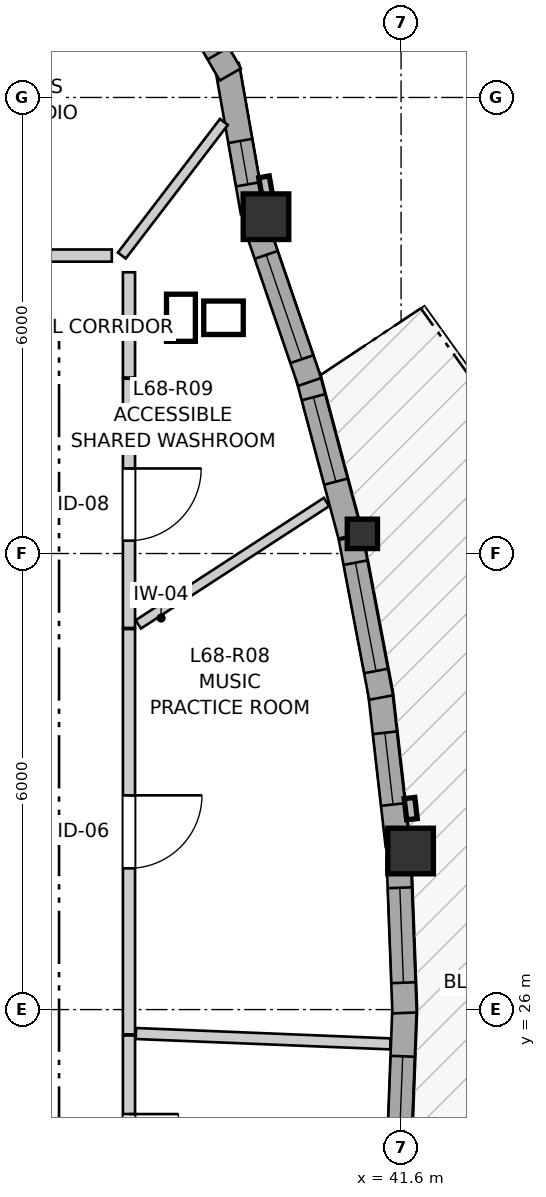
"""IFC4 building model, lengths in metres.
Left out: names, types, materials, properties, quantities, classifications, styles, units other than length and angle.
Written with IfcOpenShell. Run it as: python <this file> out.ifc"""

import sys

from ifc_helpers import new_model, si_unit, direction, frame, frame_2d, origin, origin_2d, place, context, subcontext, project, spatial, rectangle, i_section, extrude, source, transform, mapped, element, fill, save


model = new_model("IFC4")
c1 = context("Model", 3, precision=1e-05, world=origin(), true_north=direction((0.0, 1.0)))
c2 = subcontext(c1, "Body", "Model", "MODEL_VIEW")
j1 = project(units=[si_unit("LENGTHUNIT", "METRE"), si_unit("PLANEANGLEUNIT", "RADIAN")], contexts=[c1])
p1 = place(None, origin())
s1 = spatial("IfcSite", under=j1, at=p1, CompositionType="ELEMENT")
p2 = place(p1, origin())
s2 = spatial("IfcBuilding", under=s1, at=p2, CompositionType="ELEMENT")
p3 = place(p2, frame((0.0, 0.0, 227.6)))
s3 = spatial("IfcBuildingStorey", under=s2, at=p3, CompositionType="ELEMENT", Elevation=227.6)
m1 = source(origin(), c2, "Body", "SweptSolid", [
    extrude(rectangle(XDim=0.6, YDim=0.6, at=origin_2d()), origin(), (0.0, 0.0, 1.0), 2.96),
])
p4 = place(p3, frame((41.725, 28.086, 0.0), z_axis=(0.0, 0.0, 1.0), x_axis=(1.0, 0.0, 0.0)))
e1 = element("IfcColumn", 1, at=p4, inside=s3, PredefinedType="COLUMN", context=c2, shape_type="MappedRepresentation", body=[
    mapped(m1, transform((0.0, 0.0, 0.0), x_axis=(1.0, 0.0, 0.0), y_axis=(0.0, 1.0, 0.0), z_axis=(0.0, 0.0, 1.0), scale=1.0)),
])
m2 = source(origin(), c2, "Body", "SweptSolid", [
    extrude(i_section(OverallWidth=0.398, OverallDepth=0.387, WebThickness=0.019, FlangeThickness=0.03, FilletRadius=0.015, at=origin_2d()), origin(), (0.0, 0.0, 1.0), 2.96),
])
p5 = place(p3, frame((41.091, 32.259, 0.0), z_axis=(0.0, 0.0, 1.0), x_axis=(1.0, 0.0, 0.0)))
e2 = element("IfcColumn", 2, at=p5, inside=s3, PredefinedType="PILASTER", context=c2, shape_type="MappedRepresentation", body=[
    mapped(m2, transform((0.0, 0.0, 0.0), x_axis=(1.0, 0.0, 0.0), y_axis=(0.0, 1.0, 0.0), z_axis=(0.0, 0.0, 1.0), scale=1.0)),
])
p6 = place(p3, frame((39.823, 36.431, 0.0), z_axis=(0.0, 0.0, 1.0), x_axis=(1.0, 0.0, 0.0)))
e3 = element("IfcColumn", 3, at=p6, inside=s3, PredefinedType="COLUMN", context=c2, shape_type="MappedRepresentation", body=[
    mapped(m1, transform((0.0, 0.0, 0.0), x_axis=(1.0, 0.0, 0.0), y_axis=(0.0, 1.0, 0.0), z_axis=(0.0, 0.0, 1.0), scale=1.0)),
])
p7 = place(p3, frame((41.566, 23.94, 0.0), z_axis=(0.0, 0.0, 1.0), x_axis=(0.037912160544, 0.999281075615, 0.0)))
e4 = element("IfcWall", 4, at=p7, inside=s3, PredefinedType="SOLIDWALL", context=c2, shape_type="SweptSolid", body=[
    extrude(rectangle(XDim=2.106, YDim=0.32, at=frame_2d((1.053, 0.0))), origin(), (0.0, 0.0, 1.0), 2.58),
])
p8 = place(p7, frame((0.297, 0.0, 0.82)))
e5 = element("IfcOpeningElement", 5, at=p8, cuts=e4, PredefinedType="OPENING", context=c2, shape_type="SweptSolid", body=[
    extrude(rectangle(XDim=1.15, YDim=1.2, at=frame_2d((0.575, 0.6))), frame((0.0, 0.17, 0.0), z_axis=(0.0, -1.0, 0.0), x_axis=(1.0, 0.0, 0.0)), (0.0, 0.0, 1.0), 0.34),
])
p9 = place(p3, frame((41.646, 25.956, 0.0), z_axis=(0.0, 0.0, 1.0), x_axis=(-0.038018581285, 0.999277032397, 0.0)))
e6 = element("IfcWall", 6, at=p9, inside=s3, PredefinedType="SOLIDWALL", context=c2, shape_type="SweptSolid", body=[
    extrude(rectangle(XDim=2.036, YDim=0.32, at=frame_2d((1.018, 0.0))), origin(), (0.0, 0.0, 1.0), 2.58),
])
p10 = place(p9, frame((0.398, 0.0, 0.82)))
e7 = element("IfcOpeningElement", 7, at=p10, cuts=e6, PredefinedType="OPENING", context=c2, shape_type="SweptSolid", body=[
    extrude(rectangle(XDim=1.25, YDim=1.35, at=frame_2d((0.625, 0.675))), frame((0.0, 0.17, 0.0), z_axis=(0.0, -1.0, 0.0), x_axis=(1.0, 0.0, 0.0)), (0.0, 0.0, 1.0), 0.34),
])
p11 = place(p3, frame((41.556, 28.158, 0.0), z_axis=(0.0, 0.0, 1.0), x_axis=(-0.113270843693, 0.993564147888, 0.0)))
e8 = element("IfcWall", 8, at=p11, inside=s3, PredefinedType="SOLIDWALL", context=c2, shape_type="SweptSolid", body=[
    extrude(rectangle(XDim=2.048, YDim=0.32, at=frame_2d((1.024, 0.0))), origin(), (0.0, 0.0, 1.0), 2.58),
])
p12 = place(p11, frame((0.544, 0.0, 0.82)))
e9 = element("IfcOpeningElement", 9, at=p12, cuts=e8, PredefinedType="OPENING", context=c2, shape_type="SweptSolid", body=[
    extrude(rectangle(XDim=0.95, YDim=1.35, at=frame_2d((0.475, 0.675))), frame((0.0, 0.17, 0.0), z_axis=(0.0, -1.0, 0.0), x_axis=(1.0, 0.0, 0.0)), (0.0, 0.0, 1.0), 0.34),
])
p13 = place(p3, frame((41.337, 30.105, 0.0), z_axis=(0.0, 0.0, 1.0), x_axis=(-0.186614434744, 0.98243323068, 0.0)))
e10 = element("IfcWall", 10, at=p13, inside=s3, PredefinedType="SOLIDWALL", context=c2, shape_type="SweptSolid", body=[
    extrude(rectangle(XDim=2.142, YDim=0.32, at=frame_2d((1.071, 0.0))), origin(), (0.0, 0.0, 1.0), 2.58),
])
p14 = place(p13, frame((0.356, 0.0, 0.82)))
e11 = element("IfcOpeningElement", 11, at=p14, cuts=e10, PredefinedType="OPENING", context=c2, shape_type="SweptSolid", body=[
    extrude(rectangle(XDim=1.45, YDim=1.25, at=frame_2d((0.725, 0.625))), frame((0.0, 0.17, 0.0), z_axis=(0.0, -1.0, 0.0), x_axis=(1.0, 0.0, 0.0)), (0.0, 0.0, 1.0), 0.34),
])
p15 = place(p3, frame((40.931, 32.237, 0.0), z_axis=(0.0, 0.0, 1.0), x_axis=(-0.257076193941, 0.966391137433, 0.0)))
e12 = element("IfcWall", 12, at=p15, inside=s3, PredefinedType="SOLIDWALL", context=c2, shape_type="SweptSolid", body=[
    extrude(rectangle(XDim=2.177, YDim=0.32, at=frame_2d((1.088, 0.0))), origin(), (0.0, 0.0, 1.0), 2.58),
])
p16 = place(p15, frame((0.733, 0.0, 0.82)))
e13 = element("IfcOpeningElement", 13, at=p16, cuts=e12, PredefinedType="OPENING", context=c2, shape_type="SweptSolid", body=[
    extrude(rectangle(XDim=1.15, YDim=1.2, at=frame_2d((0.575, 0.6))), frame((0.0, 0.17, 0.0), z_axis=(0.0, -1.0, 0.0), x_axis=(1.0, 0.0, 0.0)), (0.0, 0.0, 1.0), 0.34),
])
p17 = place(p3, frame((40.397, 34.257, 0.0), z_axis=(0.0, 0.0, 1.0), x_axis=(-0.323634249216, 0.9461822619, 0.0)))
e14 = element("IfcWall", 14, at=p17, inside=s3, PredefinedType="SOLIDWALL", context=c2, shape_type="SweptSolid", body=[
    extrude(rectangle(XDim=2.153, YDim=0.32, at=frame_2d((1.077, 0.0))), origin(), (0.0, 0.0, 1.0), 2.58),
])
p18 = place(p17, frame((0.316, 0.0, 0.82)))
e15 = element("IfcOpeningElement", 15, at=p18, cuts=e14, PredefinedType="OPENING", context=c2, shape_type="SweptSolid", body=[
    extrude(rectangle(XDim=1.45, YDim=1.25, at=frame_2d((0.725, 0.625))), frame((0.0, 0.17, 0.0), z_axis=(0.0, -1.0, 0.0), x_axis=(1.0, 0.0, 0.0)), (0.0, 0.0, 1.0), 0.34),
])
p19 = place(p3, frame((39.649, 36.492, 0.0), z_axis=(0.0, 0.0, 1.0), x_axis=(-0.173693060482, 0.984799837906, 0.0)))
e16 = element("IfcWall", 16, at=p19, inside=s3, PredefinedType="SOLIDWALL", context=c2, shape_type="SweptSolid", body=[
    extrude(rectangle(XDim=1.962, YDim=0.32, at=frame_2d((0.981, 0.0))), origin(), (0.0, 0.0, 1.0), 2.58),
])
p20 = place(p19, frame((0.371, 0.0, 0.82)))
e17 = element("IfcOpeningElement", 17, at=p20, cuts=e16, PredefinedType="OPENING", context=c2, shape_type="SweptSolid", body=[
    extrude(rectangle(XDim=0.58, YDim=1.35, at=frame_2d((0.29, 0.675))), frame((0.0, 0.17, 0.0), z_axis=(0.0, -1.0, 0.0), x_axis=(1.0, 0.0, 0.0)), (0.0, 0.0, 1.0), 0.34),
])
p21 = place(p3, frame((39.353, 38.302, 0.0), z_axis=(0.0, 0.0, 1.0), x_axis=(-0.49990781971, 0.866078617559, 0.0)))
e18 = element("IfcWall", 18, at=p21, inside=s3, PredefinedType="SOLIDWALL", context=c2, shape_type="SweptSolid", body=[
    extrude(rectangle(XDim=2.09, YDim=0.32, at=frame_2d((1.045, 0.0))), origin(), (0.0, 0.0, 1.0), 2.58),
])
p22 = place(p21, frame((0.32, 0.0, 0.82)))
e19 = element("IfcOpeningElement", 19, at=p22, cuts=e18, PredefinedType="OPENING", context=c2, shape_type="SweptSolid", body=[
    extrude(rectangle(XDim=1.45, YDim=1.25, at=frame_2d((0.725, 0.625))), frame((0.0, 0.17, 0.0), z_axis=(0.0, -1.0, 0.0), x_axis=(1.0, 0.0, 0.0)), (0.0, 0.0, 1.0), 0.34),
])
p23 = place(p3, frame((38.02, 31.006, 0.0), z_axis=(0.0, 0.0, 1.0), x_axis=(0.0, -1.0, 0.0)))
e20 = element("IfcWall", 20, at=p23, inside=s3, PredefinedType="PARTITIONING", context=c2, shape_type="SweptSolid", body=[
    extrude(rectangle(XDim=5.332, YDim=0.16, at=frame_2d((2.666, 0.0))), origin(), (0.0, 0.0, 1.0), 2.628),
])
p24 = place(p23, frame((2.188, 0.0, 0.0)))
e21 = element("IfcOpeningElement", 21, at=p24, cuts=e20, PredefinedType="OPENING", context=c2, shape_type="SweptSolid", body=[
    extrude(rectangle(XDim=0.96, YDim=2.1, at=frame_2d((0.48, 1.05))), frame((0.0, 0.09, 0.0), z_axis=(0.0, -1.0, 0.0), x_axis=(1.0, 0.0, 0.0)), (0.0, 0.0, 1.0), 0.18),
])
p25 = place(p3, frame((38.02, 25.659, 0.0), z_axis=(0.0, 0.0, 1.0), x_axis=(0.0, -1.0, 0.0)))
e22 = element("IfcWall", 22, at=p25, inside=s3, PredefinedType="PARTITIONING", context=c2, shape_type="SweptSolid", body=[
    extrude(rectangle(XDim=3.414, YDim=0.16, at=frame_2d((1.707, 0.0))), origin(), (0.0, 0.0, 1.0), 2.628),
])
p26 = place(p25, frame((1.033, 0.0, 0.0)))
e23 = element("IfcOpeningElement", 23, at=p26, cuts=e22, PredefinedType="OPENING", context=c2, shape_type="SweptSolid", body=[
    extrude(rectangle(XDim=1.3, YDim=2.1, at=frame_2d((0.65, 1.05))), frame((0.0, 0.09, 0.0), z_axis=(0.0, -1.0, 0.0), x_axis=(1.0, 0.0, 0.0)), (0.0, 0.0, 1.0), 0.18),
])
p27 = place(p3, frame((38.02, 34.3, 0.0), z_axis=(0.0, 0.0, 1.0), x_axis=(0.0, -1.0, 0.0)))
e24 = element("IfcWall", 24, at=p27, inside=s3, PredefinedType="PARTITIONING", context=c2, shape_type="SweptSolid", body=[
    extrude(rectangle(XDim=3.279, YDim=0.16, at=frame_2d((1.64, 0.0))), origin(), (0.0, 0.0, 1.0), 2.628),
])
p28 = place(p27, frame((1.181, 0.0, 0.0)))
e25 = element("IfcOpeningElement", 25, at=p28, cuts=e24, PredefinedType="OPENING", context=c2, shape_type="SweptSolid", body=[
    extrude(rectangle(XDim=0.95, YDim=2.1, at=frame_2d((0.475, 1.05))), frame((0.0, 0.09, 0.0), z_axis=(0.0, -1.0, 0.0), x_axis=(1.0, 0.0, 0.0)), (0.0, 0.0, 1.0), 0.18),
])
p29 = place(p3, frame((38.111, 25.685, 0.0), z_axis=(0.0, 0.0, 1.0), x_axis=(0.999167325882, -0.040800182477, 0.0)))
e26 = element("IfcWall", 26, at=p29, inside=s3, PredefinedType="PARTITIONING", context=c2, shape_type="SweptSolid", body=[
    extrude(rectangle(XDim=3.351, YDim=0.145, at=frame_2d((1.675, 0.0))), origin(), (0.0, 0.0, 1.0), 2.96),
])
p30 = place(p3, frame((38.142, 31.067, 0.0), z_axis=(0.0, 0.0, 1.0), x_axis=(0.838351109823, 0.545130641827, 0.0)))
e27 = element("IfcWall", 27, at=p30, inside=s3, PredefinedType="PARTITIONING", context=c2, shape_type="SweptSolid", body=[
    extrude(rectangle(XDim=2.955, YDim=0.13, at=frame_2d((1.478, 0.0))), origin(), (0.0, 0.0, 1.0), 2.96),
])
p31 = place(p3, frame((37.926, 35.92, 0.0), z_axis=(0.0, 0.0, 1.0), x_axis=(0.606987113509, 0.794711673523, 0.0)))
e28 = element("IfcWall", 28, at=p31, inside=s3, PredefinedType="PARTITIONING", context=c2, shape_type="SweptSolid", body=[
    extrude(rectangle(XDim=2.212, YDim=0.13, at=frame_2d((1.106, 0.0))), origin(), (0.0, 0.0, 1.0), 2.96),
])
p32 = place(p3, frame((38.02, 34.315, 0.0), z_axis=(0.0, 0.0, 1.0), x_axis=(0.0, 1.0, 0.0)))
e29 = element("IfcWall", 29, at=p32, inside=s3, PredefinedType="PARTITIONING", context=c2, shape_type="SweptSolid", body=[
    extrude(rectangle(XDim=1.385, YDim=0.16, at=frame_2d((0.693, 0.0))), origin(), (0.0, 0.0, 1.0), 2.96),
])
p33 = place(p3, frame((36.415, 35.92, 0.0), z_axis=(0.0, 0.0, 1.0), x_axis=(1.0, 0.0, 0.0)))
e30 = element("IfcWall", 30, at=p33, inside=s3, PredefinedType="PARTITIONING", context=c2, shape_type="SweptSolid", body=[
    extrude(rectangle(XDim=1.379, YDim=0.16, at=frame_2d((0.689, 0.0))), origin(), (0.0, 0.0, 1.0), 2.598),
])
m3 = source(origin(), c2, "Body", "SweptSolid", [
    extrude(rectangle(XDim=1.15, YDim=1.2, at=frame_2d((0.575, 0.6))), frame((0.0, 0.03, 0.0), z_axis=(0.0, -1.0, 0.0), x_axis=(1.0, 0.0, 0.0)), (0.0, 0.0, 1.0), 0.06),
])
p34 = place(p8, origin())
e31 = element("IfcWindow", 31, at=p34, inside=s3, PartitioningType="SINGLE_PANEL", PredefinedType="WINDOW", context=c2, shape_type="MappedRepresentation", body=[
    mapped(m3, transform((0.0, 0.0, 0.0), x_axis=(1.0, 0.0, 0.0), y_axis=(0.0, 1.0, 0.0), z_axis=(0.0, 0.0, 1.0), scale=1.0)),
])
fill(e5, e31)
m4 = source(origin(), c2, "Body", "SweptSolid", [
    extrude(rectangle(XDim=1.25, YDim=1.35, at=frame_2d((0.625, 0.675))), frame((0.0, 0.03, 0.0), z_axis=(0.0, -1.0, 0.0), x_axis=(1.0, 0.0, 0.0)), (0.0, 0.0, 1.0), 0.06),
])
p35 = place(p10, origin())
e32 = element("IfcWindow", 32, at=p35, inside=s3, PartitioningType="SINGLE_PANEL", PredefinedType="WINDOW", context=c2, shape_type="MappedRepresentation", body=[
    mapped(m4, transform((0.0, 0.0, 0.0), x_axis=(1.0, 0.0, 0.0), y_axis=(0.0, 1.0, 0.0), z_axis=(0.0, 0.0, 1.0), scale=1.0)),
])
fill(e7, e32)
m5 = source(origin(), c2, "Body", "SweptSolid", [
    extrude(rectangle(XDim=0.95, YDim=1.35, at=frame_2d((0.475, 0.675))), frame((0.0, 0.03, 0.0), z_axis=(0.0, -1.0, 0.0), x_axis=(1.0, 0.0, 0.0)), (0.0, 0.0, 1.0), 0.06),
])
p36 = place(p12, origin())
e33 = element("IfcWindow", 33, at=p36, inside=s3, PartitioningType="SINGLE_PANEL", PredefinedType="WINDOW", context=c2, shape_type="MappedRepresentation", body=[
    mapped(m5, transform((0.0, 0.0, 0.0), x_axis=(1.0, 0.0, 0.0), y_axis=(0.0, 1.0, 0.0), z_axis=(0.0, 0.0, 1.0), scale=1.0)),
])
fill(e9, e33)
m6 = source(origin(), c2, "Body", "SweptSolid", [
    extrude(rectangle(XDim=1.45, YDim=1.25, at=frame_2d((0.725, 0.625))), frame((0.0, 0.03, 0.0), z_axis=(0.0, -1.0, 0.0), x_axis=(1.0, 0.0, 0.0)), (0.0, 0.0, 1.0), 0.06),
])
p37 = place(p14, origin())
e34 = element("IfcWindow", 34, at=p37, inside=s3, PartitioningType="SINGLE_PANEL", PredefinedType="WINDOW", context=c2, shape_type="MappedRepresentation", body=[
    mapped(m6, transform((0.0, 0.0, 0.0), x_axis=(1.0, 0.0, 0.0), y_axis=(0.0, 1.0, 0.0), z_axis=(0.0, 0.0, 1.0), scale=1.0)),
])
fill(e11, e34)
p38 = place(p16, origin())
e35 = element("IfcWindow", 35, at=p38, inside=s3, PartitioningType="SINGLE_PANEL", PredefinedType="WINDOW", context=c2, shape_type="MappedRepresentation", body=[
    mapped(m3, transform((0.0, 0.0, 0.0), x_axis=(1.0, 0.0, 0.0), y_axis=(0.0, 1.0, 0.0), z_axis=(0.0, 0.0, 1.0), scale=1.0)),
])
fill(e13, e35)
p39 = place(p18, origin())
e36 = element("IfcWindow", 36, at=p39, inside=s3, PartitioningType="SINGLE_PANEL", PredefinedType="WINDOW", context=c2, shape_type="MappedRepresentation", body=[
    mapped(m6, transform((0.0, 0.0, 0.0), x_axis=(1.0, 0.0, 0.0), y_axis=(0.0, 1.0, 0.0), z_axis=(0.0, 0.0, 1.0), scale=1.0)),
])
fill(e15, e36)
m7 = source(origin(), c2, "Body", "SweptSolid", [
    extrude(rectangle(XDim=0.58, YDim=1.35, at=frame_2d((0.29, 0.675))), frame((0.0, 0.03, 0.0), z_axis=(0.0, -1.0, 0.0), x_axis=(1.0, 0.0, 0.0)), (0.0, 0.0, 1.0), 0.06),
])
p40 = place(p20, origin())
e37 = element("IfcWindow", 37, at=p40, inside=s3, PartitioningType="SINGLE_PANEL", PredefinedType="WINDOW", context=c2, shape_type="MappedRepresentation", body=[
    mapped(m7, transform((0.0, 0.0, 0.0), x_axis=(1.0, 0.0, 0.0), y_axis=(0.0, 1.0, 0.0), z_axis=(0.0, 0.0, 1.0), scale=1.0)),
])
fill(e17, e37)
p41 = place(p22, origin())
e38 = element("IfcWindow", 38, at=p41, inside=s3, PartitioningType="SINGLE_PANEL", PredefinedType="WINDOW", context=c2, shape_type="MappedRepresentation", body=[
    mapped(m6, transform((0.0, 0.0, 0.0), x_axis=(1.0, 0.0, 0.0), y_axis=(0.0, 1.0, 0.0), z_axis=(0.0, 0.0, 1.0), scale=1.0)),
])
fill(e19, e38)
m8 = source(origin(), c2, "Body", "SweptSolid", [
    extrude(rectangle(XDim=0.96, YDim=2.1, at=frame_2d((0.48, 1.05))), frame((0.0, 0.025, 0.0), z_axis=(0.0, -1.0, 0.0), x_axis=(1.0, 0.0, 0.0)), (0.0, 0.0, 1.0), 0.05),
])
p42 = place(p24, origin())
e39 = element("IfcDoor", 39, at=p42, inside=s3, OperationType="SINGLE_SWING_LEFT", PredefinedType="DOOR", context=c2, shape_type="MappedRepresentation", body=[
    mapped(m8, transform((0.0, 0.0, 0.0), x_axis=(1.0, 0.0, 0.0), y_axis=(0.0, 1.0, 0.0), z_axis=(0.0, 0.0, 1.0), scale=1.0)),
])
fill(e21, e39)
m9 = source(origin(), c2, "Body", "SweptSolid", [
    extrude(rectangle(XDim=1.3, YDim=2.1, at=frame_2d((0.65, 1.05))), frame((0.0, 0.025, 0.0), z_axis=(0.0, -1.0, 0.0), x_axis=(1.0, 0.0, 0.0)), (0.0, 0.0, 1.0), 0.05),
])
p43 = place(p26, origin())
e40 = element("IfcDoor", 40, at=p43, inside=s3, OperationType="DOUBLE_DOOR_SINGLE_SWING", PredefinedType="DOOR", context=c2, shape_type="MappedRepresentation", body=[
    mapped(m9, transform((0.0, 0.0, 0.0), x_axis=(1.0, 0.0, 0.0), y_axis=(0.0, 1.0, 0.0), z_axis=(0.0, 0.0, 1.0), scale=1.0)),
])
fill(e23, e40)
m10 = source(origin(), c2, "Body", "SweptSolid", [
    extrude(rectangle(XDim=0.95, YDim=2.1, at=frame_2d((0.475, 1.05))), frame((0.0, 0.025, 0.0), z_axis=(0.0, -1.0, 0.0), x_axis=(1.0, 0.0, 0.0)), (0.0, 0.0, 1.0), 0.05),
])
p44 = place(p28, origin())
e41 = element("IfcDoor", 41, at=p44, inside=s3, OperationType="SINGLE_SWING_LEFT", PredefinedType="DOOR", context=c2, shape_type="MappedRepresentation", body=[
    mapped(m10, transform((0.0, 0.0, 0.0), x_axis=(1.0, 0.0, 0.0), y_axis=(0.0, 1.0, 0.0), z_axis=(0.0, 0.0, 1.0), scale=1.0)),
])
fill(e25, e41)
save(model, sys.argv[1])
